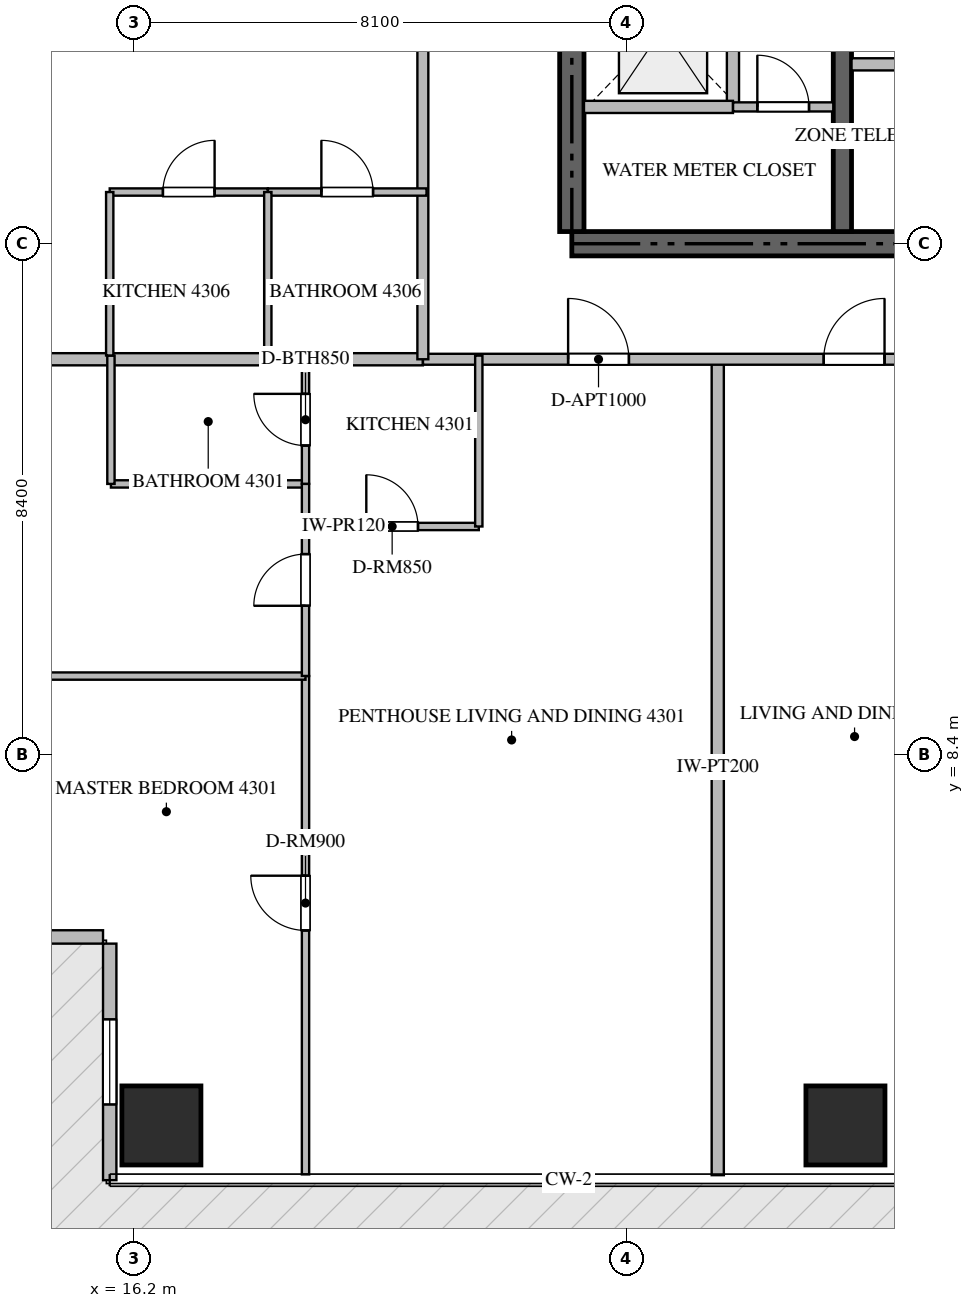
"""IFC4 building model, lengths in metres.
Left out: names, types, materials, properties, quantities, classifications, styles, units other than length and angle.
Written with IfcOpenShell. Run it as: python <this file> out.ifc"""

import sys

from ifc_helpers import new_model, si_unit, direction, frame, frame_2d, origin, origin_2d, place, context, subcontext, project, spatial, rectangle, extrude, source, transform, mapped, element, fill, save


model = new_model("IFC4")
c1 = context("Model", 3, precision=1e-05, world=origin(), true_north=direction((0.0, 1.0)))
c2 = subcontext(c1, "Body", "Model", "MODEL_VIEW")
j1 = project(units=[si_unit("LENGTHUNIT", "METRE"), si_unit("PLANEANGLEUNIT", "RADIAN")], contexts=[c1])
p1 = place(None, origin())
s1 = spatial("IfcSite", under=j1, at=p1, CompositionType="ELEMENT")
p2 = place(p1, origin())
s2 = spatial("IfcBuilding", under=s1, at=p2, CompositionType="ELEMENT")
p3 = place(p2, frame((0.0, 0.0, 172.65)))
s3 = spatial("IfcBuildingStorey", under=s2, at=p3, CompositionType="ELEMENT", Elevation=172.65)
p4 = place(p3, frame((23.4, 16.8, -0.26), z_axis=(0.0, 0.0, 1.0), x_axis=(1.0, 0.0, 0.0)))
e1 = element("IfcWall", 1, at=p4, inside=s3, PredefinedType="SHEAR", context=c2, shape_type="SweptSolid", body=[
    extrude(rectangle(XDim=18.0, YDim=0.4, at=frame_2d((9.0, 0.0))), origin(), (0.0, 0.0, 1.0), 3.748),
])
p5 = place(p3, frame((23.4, 17.0, -0.26), z_axis=(0.0, 0.0, 1.0), x_axis=(0.0, 1.0, 0.0)))
e2 = element("IfcWall", 2, at=p5, inside=s3, PredefinedType="SHEAR", context=c2, shape_type="SweptSolid", body=[
    extrude(rectangle(XDim=4.85, YDim=0.4, at=frame_2d((2.425, 0.0))), origin(), (0.0, 0.0, 1.0), 3.748),
])
p6 = place(p3, frame((27.85, 17.0, -0.26), z_axis=(0.0, 0.0, 1.0), x_axis=(0.0, 1.0, 0.0)))
e3 = element("IfcWall", 3, at=p6, inside=s3, PredefinedType="SHEAR", context=c2, shape_type="SweptSolid", body=[
    extrude(rectangle(XDim=4.85, YDim=0.3, at=frame_2d((2.425, 0.0))), origin(), (0.0, 0.0, 1.0), 3.748),
])
m1 = source(origin(), c2, "Body", "SweptSolid", [
    extrude(rectangle(XDim=1.3, YDim=1.3, at=origin_2d()), origin(), (0.0, 0.0, 1.0), 3.75),
])
for number, where, z_axis, x_axis in (
    (4, (16.65, 2.3, -0.26), (0.0, 0.0, 1.0), (1.0, 0.0, 0.0)),
    (5, (27.9, 2.3, -0.26), (0.0, 0.0, 1.0), (1.0, 0.0, 0.0)),
):
    element("IfcColumn", number, at=place(p3, frame(where, z_axis=z_axis, x_axis=x_axis)), inside=s3, PredefinedType="COLUMN", context=c2, shape_type="MappedRepresentation", body=[
        mapped(m1, transform((0.0, 0.0, 0.0), scale=1.0)),
    ])
p7 = place(p3, frame((11.91, 5.4, 0.0), z_axis=(0.0, 0.0, 1.0), x_axis=(1.0, 0.0, 0.0)))
e6 = element("IfcWall", 6, at=p7, inside=s3, PredefinedType="ELEMENTEDWALL", context=c2, shape_type="SweptSolid", body=[
    extrude(rectangle(XDim=3.78, YDim=0.22, at=frame_2d((1.89, 0.0))), origin(), (0.0, 0.0, 1.0), 3.475),
])
p8 = place(p7, frame((1.19, 0.0, 0.65)))
e7 = element("IfcOpeningElement", 7, at=p8, cuts=e6, PredefinedType="OPENING", context=c2, shape_type="SweptSolid", body=[
    extrude(rectangle(XDim=1.4, YDim=2.05, at=frame_2d((0.7, 1.025))), frame((0.0, 0.12, 0.0), z_axis=(0.0, -1.0, 0.0), x_axis=(1.0, 0.0, 0.0)), (0.0, 0.0, 1.0), 0.24),
])
p9 = place(p3, frame((15.8, 5.29, 0.0), z_axis=(0.0, 0.0, 1.0), x_axis=(0.0, -1.0, 0.0)))
e8 = element("IfcWall", 8, at=p9, inside=s3, PredefinedType="ELEMENTEDWALL", context=c2, shape_type="SweptSolid", body=[
    extrude(rectangle(XDim=3.89, YDim=0.22, at=frame_2d((1.945, 0.0))), origin(), (0.0, 0.0, 1.0), 3.475),
])
p10 = place(p9, frame((1.245, 0.0, 0.65)))
e9 = element("IfcOpeningElement", 9, at=p10, cuts=e8, PredefinedType="OPENING", context=c2, shape_type="SweptSolid", body=[
    extrude(rectangle(XDim=1.4, YDim=2.05, at=frame_2d((0.7, 1.025))), frame((0.0, 0.12, 0.0), z_axis=(0.0, -1.0, 0.0), x_axis=(1.0, 0.0, 0.0)), (0.0, 0.0, 1.0), 0.24),
])
p11 = place(p3, frame((26.05, 19.05, 0.0), z_axis=(0.0, 0.0, 1.0), x_axis=(0.0, 1.0, 0.0)))
e10 = element("IfcWall", 10, at=p11, inside=s3, PredefinedType="STANDARD", context=c2, shape_type="SweptSolid", body=[
    extrude(rectangle(XDim=2.5, YDim=0.2, at=frame_2d((1.25, 0.0))), origin(), (0.0, 0.0, 1.0), 3.49),
])
p12 = place(p3, frame((23.6, 19.05, 0.0), z_axis=(0.0, 0.0, 1.0), x_axis=(1.0, 0.0, 0.0)))
e11 = element("IfcWall", 11, at=p12, inside=s3, PredefinedType="STANDARD", context=c2, shape_type="SweptSolid", body=[
    extrude(rectangle(XDim=2.45, YDim=0.2, at=frame_2d((1.225, 0.0))), origin(), (0.0, 0.0, 1.0), 3.49),
])
p13 = place(p3, frame((26.052, 19.05, 0.0), z_axis=(0.0, 0.0, 1.0), x_axis=(1.0, 0.0, 0.0)))
e12 = element("IfcWall", 12, at=p13, inside=s3, PredefinedType="PARTITIONING", context=c2, shape_type="SweptSolid", body=[
    extrude(rectangle(XDim=1.648, YDim=0.15, at=frame_2d((0.824, 0.0))), origin(), (0.0, 0.0, 1.0), 3.49),
])
p14 = place(p13, frame((0.399, 0.0, 0.0)))
e13 = element("IfcOpeningElement", 13, at=p14, cuts=e12, PredefinedType="OPENING", context=c2, shape_type="SweptSolid", body=[
    extrude(rectangle(XDim=0.85, YDim=2.1, at=frame_2d((0.425, 1.05))), frame((0.0, 0.085, 0.0), z_axis=(0.0, -1.0, 0.0), x_axis=(1.0, 0.0, 0.0)), (0.0, 0.0, 1.0), 0.17),
])
p15 = place(p3, frame((28.0, 19.75, 0.0), z_axis=(0.0, 0.0, 1.0), x_axis=(1.0, 0.0, 0.0)))
e14 = element("IfcWall", 14, at=p15, inside=s3, PredefinedType="STANDARD", context=c2, shape_type="SweptSolid", body=[
    extrude(rectangle(XDim=6.0, YDim=0.2, at=frame_2d((3.0, 0.0))), origin(), (0.0, 0.0, 1.0), 3.49),
])
p16 = place(p15, frame((2.55, 0.0, 0.0)))
e15 = element("IfcOpeningElement", 15, at=p16, cuts=e14, PredefinedType="OPENING", context=c2, shape_type="SweptSolid", body=[
    extrude(rectangle(XDim=0.9, YDim=2.1, at=frame_2d((0.45, 1.05))), frame((0.0, 0.11, 0.0), z_axis=(0.0, -1.0, 0.0), x_axis=(1.0, 0.0, 0.0)), (0.0, 0.0, 1.0), 0.22),
])
p17 = place(p3, frame((25.8, 1.482, 0.0), z_axis=(0.0, 0.0, 1.0), x_axis=(0.0, 1.0, 0.0)))
e16 = element("IfcWall", 16, at=p17, inside=s3, PredefinedType="PARTITIONING", context=c2, shape_type="SweptSolid", body=[
    extrude(rectangle(XDim=13.418, YDim=0.2, at=frame_2d((6.709, 0.0))), origin(), (0.0, 0.0, 1.0), 3.49),
])
p18 = place(p3, frame((7.882, 14.9, 0.0), z_axis=(0.0, 0.0, 1.0), x_axis=(1.0, 0.0, 0.0)))
e17 = element("IfcWall", 17, at=p18, inside=s3, PredefinedType="PARTITIONING", context=c2, shape_type="SweptSolid", body=[
    extrude(rectangle(XDim=13.068, YDim=0.2, at=frame_2d((6.534, 0.0))), origin(), (0.0, 0.0, 1.0), 3.49),
])
p19 = place(p3, frame((20.952, 14.9, 0.0), z_axis=(0.0, 0.0, 1.0), x_axis=(1.0, 0.0, 0.0)))
e18 = element("IfcWall", 18, at=p19, inside=s3, PredefinedType="PARTITIONING", context=c2, shape_type="SweptSolid", body=[
    extrude(rectangle(XDim=22.896, YDim=0.18, at=frame_2d((11.448, 0.0))), origin(), (0.0, 0.0, 1.0), 3.49),
])
p20 = place(p19, frame((2.387, 0.0, 0.0)))
e19 = element("IfcOpeningElement", 19, at=p20, cuts=e18, PredefinedType="OPENING", context=c2, shape_type="SweptSolid", body=[
    extrude(rectangle(XDim=1.0, YDim=2.15, at=frame_2d((0.5, 1.075))), frame((0.0, 0.1, 0.0), z_axis=(0.0, -1.0, 0.0), x_axis=(1.0, 0.0, 0.0)), (0.0, 0.0, 1.0), 0.2),
])
p21 = place(p19, frame((6.591, 0.0, 0.0)))
e20 = element("IfcOpeningElement", 20, at=p21, cuts=e18, PredefinedType="OPENING", context=c2, shape_type="SweptSolid", body=[
    extrude(rectangle(XDim=1.0, YDim=2.15, at=frame_2d((0.5, 1.075))), frame((0.0, 0.1, 0.0), z_axis=(0.0, -1.0, 0.0), x_axis=(1.0, 0.0, 0.0)), (0.0, 0.0, 1.0), 0.2),
])
p22 = place(p19, frame((16.51, 0.0, 0.0)))
e21 = element("IfcOpeningElement", 21, at=p22, cuts=e18, PredefinedType="OPENING", context=c2, shape_type="SweptSolid", body=[
    extrude(rectangle(XDim=1.0, YDim=2.15, at=frame_2d((0.5, 1.075))), frame((0.0, 0.1, 0.0), z_axis=(0.0, -1.0, 0.0), x_axis=(1.0, 0.0, 0.0)), (0.0, 0.0, 1.0), 0.2),
])
p23 = place(p3, frame((20.95, 14.9, 0.0), z_axis=(0.0, 0.0, 1.0), x_axis=(0.0, 1.0, 0.0)))
e22 = element("IfcWall", 22, at=p23, inside=s3, PredefinedType="PARTITIONING", context=c2, shape_type="SweptSolid", body=[
    extrude(rectangle(XDim=18.7, YDim=0.18, at=frame_2d((9.35, 0.0))), origin(), (0.0, 0.0, 1.0), 3.49),
])
p24 = place(p23, frame((5.328, 0.0, 0.0)))
e23 = element("IfcOpeningElement", 23, at=p24, cuts=e22, PredefinedType="OPENING", context=c2, shape_type="SweptSolid", body=[
    extrude(rectangle(XDim=1.0, YDim=2.15, at=frame_2d((0.5, 1.075))), frame((0.0, 0.1, 0.0), z_axis=(0.0, -1.0, 0.0), x_axis=(1.0, 0.0, 0.0)), (0.0, 0.0, 1.0), 0.2),
])
p25 = place(p23, frame((14.62, 0.0, 0.0)))
e24 = element("IfcOpeningElement", 24, at=p25, cuts=e22, PredefinedType="OPENING", context=c2, shape_type="SweptSolid", body=[
    extrude(rectangle(XDim=1.0, YDim=2.15, at=frame_2d((0.5, 1.075))), frame((0.0, 0.1, 0.0), z_axis=(0.0, -1.0, 0.0), x_axis=(1.0, 0.0, 0.0)), (0.0, 0.0, 1.0), 0.2),
])
p26 = place(p3, frame((19.02, 12.15, 0.0), z_axis=(0.0, 0.0, 1.0), x_axis=(1.0, 0.0, 0.0)))
e25 = element("IfcWall", 25, at=p26, inside=s3, PredefinedType="PARTITIONING", context=c2, shape_type="SweptSolid", body=[
    extrude(rectangle(XDim=2.85, YDim=0.12, at=frame_2d((1.425, 0.0))), origin(), (0.0, 0.0, 1.0), 3.49),
])
p27 = place(p26, frame((1.0, 0.0, 0.0)))
e26 = element("IfcOpeningElement", 26, at=p27, cuts=e25, PredefinedType="OPENING", context=c2, shape_type="SweptSolid", body=[
    extrude(rectangle(XDim=0.85, YDim=2.1, at=frame_2d((0.425, 1.05))), frame((0.0, 0.07, 0.0), z_axis=(0.0, -1.0, 0.0), x_axis=(1.0, 0.0, 0.0)), (0.0, 0.0, 1.0), 0.14),
])
p28 = place(p3, frame((21.87, 12.15, 0.0), z_axis=(0.0, 0.0, 1.0), x_axis=(0.0, 1.0, 0.0)))
e27 = element("IfcWall", 27, at=p28, inside=s3, PredefinedType="PARTITIONING", context=c2, shape_type="SweptSolid", body=[
    extrude(rectangle(XDim=2.81, YDim=0.12, at=frame_2d((1.405, 0.0))), origin(), (0.0, 0.0, 1.0), 3.49),
])
p29 = place(p3, frame((19.02, 1.495, 0.0), z_axis=(0.0, 0.0, 1.0), x_axis=(0.0, 1.0, 0.0)))
e28 = element("IfcWall", 28, at=p29, inside=s3, PredefinedType="PARTITIONING", context=c2, shape_type="SweptSolid", body=[
    extrude(rectangle(XDim=8.195, YDim=0.12, at=frame_2d((4.097, 0.0))), origin(), (0.0, 0.0, 1.0), 3.49),
])
p30 = place(p29, frame((4.012, 0.0, 0.0)))
e29 = element("IfcOpeningElement", 29, at=p30, cuts=e28, PredefinedType="OPENING", context=c2, shape_type="SweptSolid", body=[
    extrude(rectangle(XDim=0.9, YDim=2.1, at=frame_2d((0.45, 1.05))), frame((0.0, 0.07, 0.0), z_axis=(0.0, -1.0, 0.0), x_axis=(1.0, 0.0, 0.0)), (0.0, 0.0, 1.0), 0.14),
])
p31 = place(p3, frame((7.895, 9.69, 0.0), z_axis=(0.0, 0.0, 1.0), x_axis=(1.0, 0.0, 0.0)))
e30 = element("IfcWall", 30, at=p31, inside=s3, PredefinedType="PARTITIONING", context=c2, shape_type="SweptSolid", body=[
    extrude(rectangle(XDim=11.125, YDim=0.12, at=frame_2d((5.562, 0.0))), origin(), (0.0, 0.0, 1.0), 3.49),
])
p32 = place(p3, frame((15.82, 12.85, 0.0), z_axis=(0.0, 0.0, 1.0), x_axis=(1.0, 0.0, 0.0)))
e31 = element("IfcWall", 31, at=p32, inside=s3, PredefinedType="PARTITIONING", context=c2, shape_type="SweptSolid", body=[
    extrude(rectangle(XDim=3.2, YDim=0.12, at=frame_2d((1.6, 0.0))), origin(), (0.0, 0.0, 1.0), 3.49),
])
p33 = place(p3, frame((15.82, 12.85, 0.0), z_axis=(0.0, 0.0, 1.0), x_axis=(0.0, 1.0, 0.0)))
e32 = element("IfcWall", 32, at=p33, inside=s3, PredefinedType="PARTITIONING", context=c2, shape_type="SweptSolid", body=[
    extrude(rectangle(XDim=2.11, YDim=0.12, at=frame_2d((1.055, 0.0))), origin(), (0.0, 0.0, 1.0), 3.49),
])
p34 = place(p3, frame((19.02, 9.692, 0.0), z_axis=(0.0, 0.0, 1.0), x_axis=(0.0, 1.0, 0.0)))
e33 = element("IfcWall", 33, at=p34, inside=s3, PredefinedType="PARTITIONING", context=c2, shape_type="SweptSolid", body=[
    extrude(rectangle(XDim=3.158, YDim=0.12, at=frame_2d((1.579, 0.0))), origin(), (0.0, 0.0, 1.0), 3.49),
])
p35 = place(p34, frame((1.154, 0.0, 0.0)))
e34 = element("IfcOpeningElement", 34, at=p35, cuts=e33, PredefinedType="OPENING", context=c2, shape_type="SweptSolid", body=[
    extrude(rectangle(XDim=0.85, YDim=2.1, at=frame_2d((0.425, 1.05))), frame((0.0, 0.07, 0.0), z_axis=(0.0, -1.0, 0.0), x_axis=(1.0, 0.0, 0.0)), (0.0, 0.0, 1.0), 0.14),
])
p36 = place(p3, frame((19.02, 12.852, 0.0), z_axis=(0.0, 0.0, 1.0), x_axis=(0.0, 1.0, 0.0)))
e35 = element("IfcWall", 35, at=p36, inside=s3, PredefinedType="PARTITIONING", context=c2, shape_type="SweptSolid", body=[
    extrude(rectangle(XDim=2.108, YDim=0.12, at=frame_2d((1.054, 0.0))), origin(), (0.0, 0.0, 1.0), 3.49),
])
p37 = place(p36, frame((0.629, 0.0, 0.0)))
e36 = element("IfcOpeningElement", 36, at=p37, cuts=e35, PredefinedType="OPENING", context=c2, shape_type="SweptSolid", body=[
    extrude(rectangle(XDim=0.85, YDim=2.1, at=frame_2d((0.425, 1.05))), frame((0.0, 0.07, 0.0), z_axis=(0.0, -1.0, 0.0), x_axis=(1.0, 0.0, 0.0)), (0.0, 0.0, 1.0), 0.14),
])
p38 = place(p3, frame((15.8, 17.65, 0.0), z_axis=(0.0, 0.0, 1.0), x_axis=(1.0, 0.0, 0.0)))
e37 = element("IfcWall", 37, at=p38, inside=s3, PredefinedType="PARTITIONING", context=c2, shape_type="SweptSolid", body=[
    extrude(rectangle(XDim=2.6, YDim=0.12, at=frame_2d((1.3, 0.0))), origin(), (0.0, 0.0, 1.0), 3.49),
])
p39 = place(p38, frame((0.875, 0.0, 0.0)))
e38 = element("IfcOpeningElement", 38, at=p39, cuts=e37, PredefinedType="OPENING", context=c2, shape_type="SweptSolid", body=[
    extrude(rectangle(XDim=0.85, YDim=2.1, at=frame_2d((0.425, 1.05))), frame((0.0, 0.07, 0.0), z_axis=(0.0, -1.0, 0.0), x_axis=(1.0, 0.0, 0.0)), (0.0, 0.0, 1.0), 0.14),
])
p40 = place(p3, frame((18.402, 17.65, 0.0), z_axis=(0.0, 0.0, 1.0), x_axis=(1.0, 0.0, 0.0)))
e39 = element("IfcWall", 39, at=p40, inside=s3, PredefinedType="PARTITIONING", context=c2, shape_type="SweptSolid", body=[
    extrude(rectangle(XDim=2.608, YDim=0.12, at=frame_2d((1.304, 0.0))), origin(), (0.0, 0.0, 1.0), 3.49),
])
p41 = place(p40, frame((0.879, 0.0, 0.0)))
e40 = element("IfcOpeningElement", 40, at=p41, cuts=e39, PredefinedType="OPENING", context=c2, shape_type="SweptSolid", body=[
    extrude(rectangle(XDim=0.85, YDim=2.1, at=frame_2d((0.425, 1.05))), frame((0.0, 0.07, 0.0), z_axis=(0.0, -1.0, 0.0), x_axis=(1.0, 0.0, 0.0)), (0.0, 0.0, 1.0), 0.14),
])
p42 = place(p3, frame((18.4, 14.84, 0.0), z_axis=(0.0, 0.0, 1.0), x_axis=(0.0, 1.0, 0.0)))
e41 = element("IfcWall", 41, at=p42, inside=s3, PredefinedType="PARTITIONING", context=c2, shape_type="SweptSolid", body=[
    extrude(rectangle(XDim=2.81, YDim=0.12, at=frame_2d((1.405, 0.0))), origin(), (0.0, 0.0, 1.0), 3.49),
])
p43 = place(p3, frame((15.8, 14.962, 0.0), z_axis=(0.0, 0.0, 1.0), x_axis=(0.0, 1.0, 0.0)))
e42 = element("IfcWall", 42, at=p43, inside=s3, PredefinedType="PARTITIONING", context=c2, shape_type="SweptSolid", body=[
    extrude(rectangle(XDim=2.688, YDim=0.12, at=frame_2d((1.344, 0.0))), origin(), (0.0, 0.0, 1.0), 3.49),
])
m2 = source(origin(), c2, "Body", "SweptSolid", [
    extrude(rectangle(XDim=1.4, YDim=2.05, at=frame_2d((0.7, 1.025))), frame((0.0, 0.03, 0.0), z_axis=(0.0, -1.0, 0.0), x_axis=(1.0, 0.0, 0.0)), (0.0, 0.0, 1.0), 0.06),
])
p44 = place(p10, origin())
e43 = element("IfcWindow", 43, at=p44, inside=s3, PartitioningType="SINGLE_PANEL", PredefinedType="WINDOW", context=c2, shape_type="MappedRepresentation", body=[
    mapped(m2, transform((0.0, 0.0, 0.0), scale=1.0)),
])
fill(e9, e43)
m3 = source(origin(), c2, "Body", "SweptSolid", [
    extrude(rectangle(XDim=0.85, YDim=2.1, at=frame_2d((0.425, 1.05))), frame((0.0, 0.025, 0.0), z_axis=(0.0, -1.0, 0.0), x_axis=(1.0, 0.0, 0.0)), (0.0, 0.0, 1.0), 0.05),
])
p45 = place(p14, origin())
e44 = element("IfcDoor", 44, at=p45, inside=s3, OperationType="SINGLE_SWING_LEFT", PredefinedType="DOOR", context=c2, shape_type="MappedRepresentation", body=[
    mapped(m3, transform((0.0, 0.0, 0.0), scale=1.0)),
])
fill(e13, e44)
m4 = source(origin(), c2, "Body", "SweptSolid", [
    extrude(rectangle(XDim=1.0, YDim=2.15, at=frame_2d((0.5, 1.075))), frame((0.0, 0.025, 0.0), z_axis=(0.0, -1.0, 0.0), x_axis=(1.0, 0.0, 0.0)), (0.0, 0.0, 1.0), 0.05),
])
p46 = place(p20, origin())
e45 = element("IfcDoor", 45, at=p46, inside=s3, OperationType="SINGLE_SWING_LEFT", PredefinedType="DOOR", context=c2, shape_type="MappedRepresentation", body=[
    mapped(m4, transform((0.0, 0.0, 0.0), scale=1.0)),
])
fill(e19, e45)
p47 = place(p21, origin())
e46 = element("IfcDoor", 46, at=p47, inside=s3, OperationType="SINGLE_SWING_RIGHT", PredefinedType="DOOR", context=c2, shape_type="MappedRepresentation", body=[
    mapped(m4, transform((0.0, 0.0, 0.0), scale=1.0)),
])
fill(e20, e46)
p48 = place(p27, origin())
e47 = element("IfcDoor", 47, at=p48, inside=s3, OperationType="SINGLE_SWING_LEFT", PredefinedType="DOOR", context=c2, shape_type="MappedRepresentation", body=[
    mapped(m3, transform((0.0, 0.0, 0.0), scale=1.0)),
])
fill(e26, e47)
m5 = source(origin(), c2, "Body", "SweptSolid", [
    extrude(rectangle(XDim=0.9, YDim=2.1, at=frame_2d((0.45, 1.05))), frame((0.0, 0.025, 0.0), z_axis=(0.0, -1.0, 0.0), x_axis=(1.0, 0.0, 0.0)), (0.0, 0.0, 1.0), 0.05),
])
p49 = place(p30, origin())
e48 = element("IfcDoor", 48, at=p49, inside=s3, OperationType="SINGLE_SWING_RIGHT", PredefinedType="DOOR", context=c2, shape_type="MappedRepresentation", body=[
    mapped(m5, transform((0.0, 0.0, 0.0), scale=1.0)),
])
fill(e29, e48)
p50 = place(p35, origin())
e49 = element("IfcDoor", 49, at=p50, inside=s3, OperationType="SINGLE_SWING_LEFT", PredefinedType="DOOR", context=c2, shape_type="MappedRepresentation", body=[
    mapped(m3, transform((0.0, 0.0, 0.0), scale=1.0)),
])
fill(e34, e49)
p51 = place(p37, origin())
e50 = element("IfcDoor", 50, at=p51, inside=s3, OperationType="SINGLE_SWING_RIGHT", PredefinedType="DOOR", context=c2, shape_type="MappedRepresentation", body=[
    mapped(m3, transform((0.0, 0.0, 0.0), scale=1.0)),
])
fill(e36, e50)
p52 = place(p39, origin())
e51 = element("IfcDoor", 51, at=p52, inside=s3, OperationType="SINGLE_SWING_RIGHT", PredefinedType="DOOR", context=c2, shape_type="MappedRepresentation", body=[
    mapped(m3, transform((0.0, 0.0, 0.0), scale=1.0)),
])
fill(e38, e51)
p53 = place(p41, origin())
e52 = element("IfcDoor", 52, at=p53, inside=s3, OperationType="SINGLE_SWING_LEFT", PredefinedType="DOOR", context=c2, shape_type="MappedRepresentation", body=[
    mapped(m3, transform((0.0, 0.0, 0.0), scale=1.0)),
])
fill(e40, e52)
save(model, sys.argv[1])
